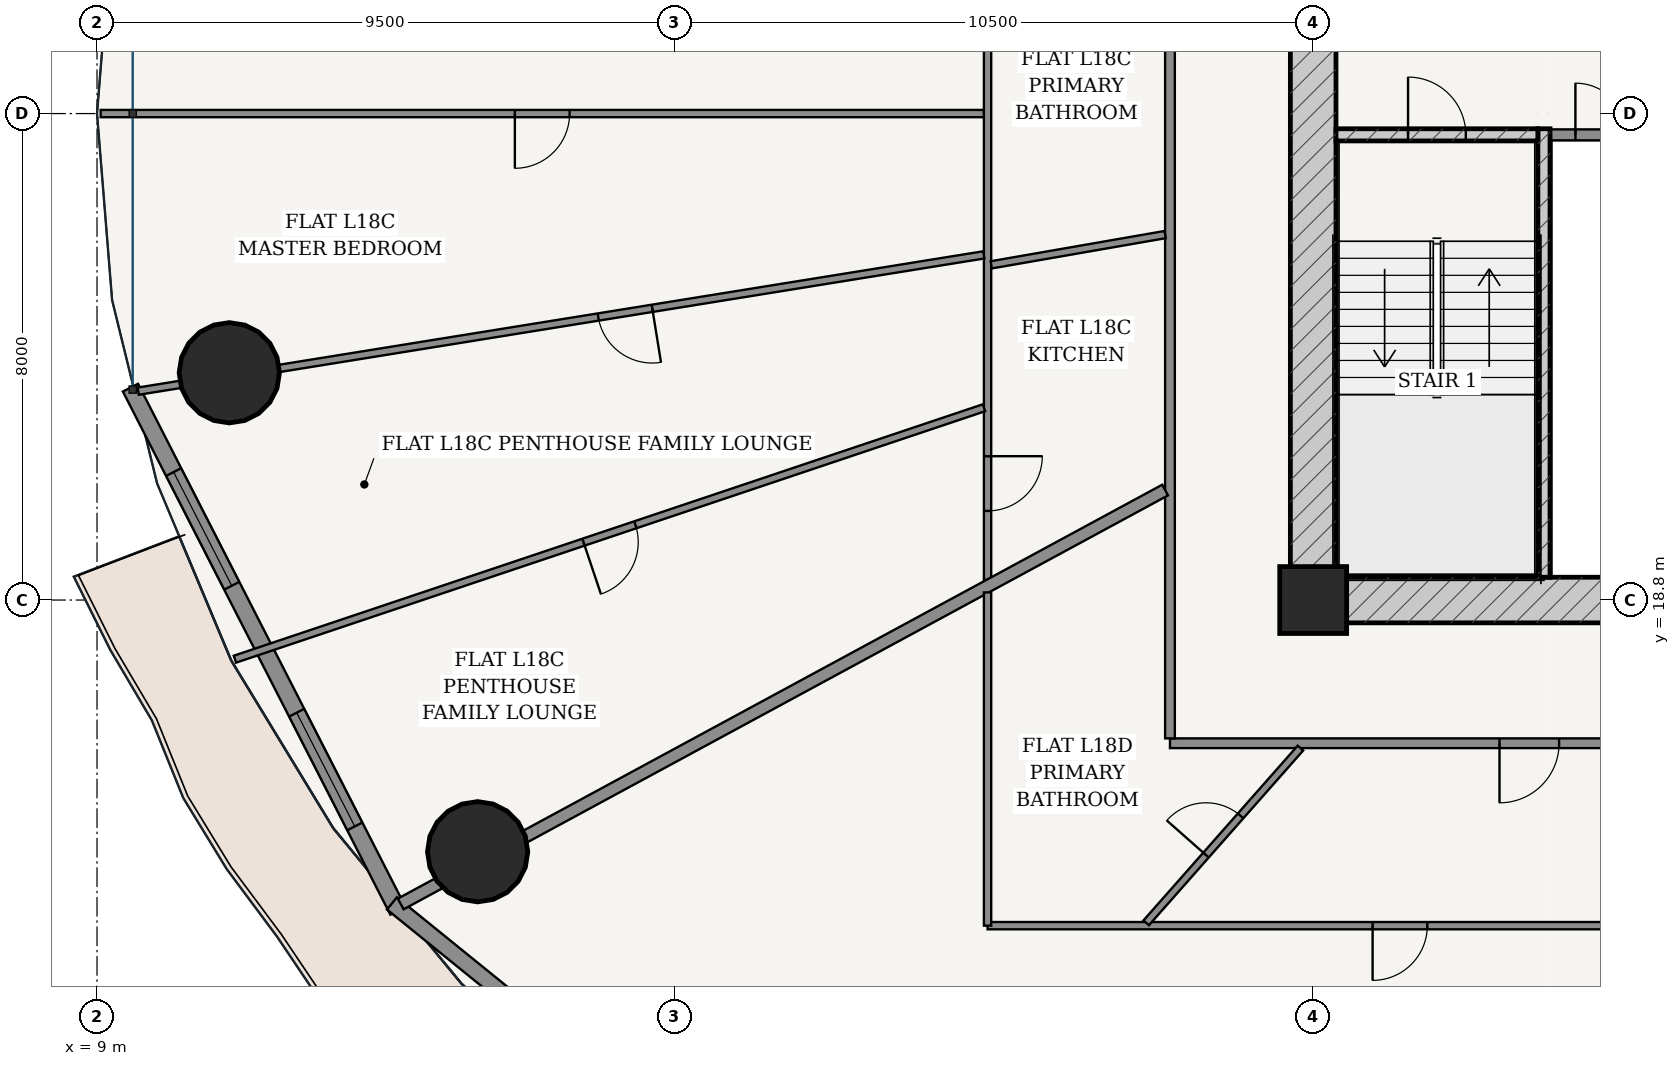
"""IFC4 building model, lengths in metres.
Left out: names, types, materials, properties, quantities, classifications, styles, units other than length and angle.
Written with IfcOpenShell. Run it as: python <this file> out.ifc"""

import sys

from ifc_helpers import new_model, si_unit, direction, frame, frame_2d, origin, origin_2d, place, context, subcontext, project, spatial, rectangle, hollow_circle, extrude, source, transform, mapped, element, fill, save


model = new_model("IFC4")
c1 = context("Model", 3, precision=1e-05, world=origin(), true_north=direction((-0.2419218956, 0.970295726276)))
c2 = subcontext(c1, "Body", "Model", "MODEL_VIEW")
j1 = project(units=[si_unit("LENGTHUNIT", "METRE"), si_unit("PLANEANGLEUNIT", "RADIAN")], contexts=[c1])
p1 = place(None, origin())
s1 = spatial("IfcSite", under=j1, at=p1, CompositionType="ELEMENT")
p2 = place(p1, origin())
s2 = spatial("IfcBuilding", under=s1, at=p2, CompositionType="ELEMENT")
p3 = place(p2, frame((0.0, 0.0, 70.8)))
s3 = spatial("IfcBuildingStorey", under=s2, at=p3, CompositionType="ELEMENT", Elevation=70.8)
p4 = place(p3, frame((29.0, 18.8, 0.0), z_axis=(0.0, 0.0, 1.0), x_axis=(1.0, 0.0, 0.0)))
e1 = element("IfcColumn", 1, at=p4, inside=s3, PredefinedType="COLUMN", context=c2, shape_type="SweptSolid", body=[
    extrude(rectangle(XDim=1.1, YDim=1.1, at=origin_2d()), origin(), (0.0, 0.0, 1.0), 3.6),
])
p5 = place(p3, frame((28.625, 18.8, 0.0), z_axis=(0.0, 0.0, 1.0), x_axis=(1.0, 0.0, 0.0)))
e2 = element("IfcWall", 2, at=p5, inside=s3, PredefinedType="SHEAR", context=c2, shape_type="SweptSolid", body=[
    extrude(rectangle(XDim=18.75, YDim=0.75, at=frame_2d((9.375, 0.0))), origin(), (0.0, 0.0, 1.0), 3.15),
])
p6 = place(p5, frame((6.927, 0.0, 0.0)))
e3 = element("IfcOpeningElement", 3, at=p6, cuts=e2, PredefinedType="OPENING", context=c2, shape_type="SweptSolid", body=[
    extrude(rectangle(XDim=0.85, YDim=2.1, at=frame_2d((0.425, 1.05))), frame((0.0, 0.385, 0.0), z_axis=(0.0, -1.0, 0.0), x_axis=(1.0, 0.0, 0.0)), (0.0, 0.0, 1.0), 0.77),
])
p7 = place(p5, frame((8.95, 0.0, 0.0)))
e4 = element("IfcOpeningElement", 4, at=p7, cuts=e2, PredefinedType="OPENING", context=c2, shape_type="SweptSolid", body=[
    extrude(rectangle(XDim=0.85, YDim=2.1, at=frame_2d((0.425, 1.05))), frame((0.0, 0.385, 0.0), z_axis=(0.0, -1.0, 0.0), x_axis=(1.0, 0.0, 0.0)), (0.0, 0.0, 1.0), 0.77),
])
p8 = place(p5, frame((10.972, 0.0, 0.0)))
e5 = element("IfcOpeningElement", 5, at=p8, cuts=e2, PredefinedType="OPENING", context=c2, shape_type="SweptSolid", body=[
    extrude(rectangle(XDim=0.85, YDim=2.1, at=frame_2d((0.425, 1.05))), frame((0.0, 0.385, 0.0), z_axis=(0.0, -1.0, 0.0), x_axis=(1.0, 0.0, 0.0)), (0.0, 0.0, 1.0), 0.77),
])
p9 = place(p3, frame((29.0, 19.175, 0.0), z_axis=(0.0, 0.0, 1.0), x_axis=(0.0, 1.0, 0.0)))
e6 = element("IfcWall", 6, at=p9, inside=s3, PredefinedType="SHEAR", context=c2, shape_type="SweptSolid", body=[
    extrude(rectangle(XDim=15.25, YDim=0.75, at=frame_2d((7.625, 0.0))), origin(), (0.0, 0.0, 1.0), 3.15),
])
p10 = place(p9, frame((9.875, 0.0, 0.0)))
e7 = element("IfcOpeningElement", 7, at=p10, cuts=e6, PredefinedType="OPENING", context=c2, shape_type="SweptSolid", body=[
    extrude(rectangle(XDim=1.5, YDim=2.2, at=frame_2d((0.75, 1.1))), frame((0.0, 0.385, 0.0), z_axis=(0.0, -1.0, 0.0), x_axis=(1.0, 0.0, 0.0)), (0.0, 0.0, 1.0), 0.77),
])
p11 = place(p3, frame((32.795, 19.175, 0.0), z_axis=(0.0, 0.0, 1.0), x_axis=(0.0, 1.0, 0.0)))
e8 = element("IfcWall", 8, at=p11, inside=s3, PredefinedType="SOLIDWALL", context=c2, shape_type="SweptSolid", body=[
    extrude(rectangle(XDim=7.375, YDim=0.2, at=frame_2d((3.688, 0.0))), origin(), (0.0, 0.0, 1.0), 3.15),
])
p12 = place(p3, frame((29.375, 26.45, 0.0), z_axis=(0.0, 0.0, 1.0), x_axis=(1.0, 0.0, 0.0)))
e9 = element("IfcWall", 9, at=p12, inside=s3, PredefinedType="SOLIDWALL", context=c2, shape_type="SweptSolid", body=[
    extrude(rectangle(XDim=3.32, YDim=0.2, at=frame_2d((1.66, 0.0))), origin(), (0.0, 0.0, 1.0), 3.15),
])
p13 = place(p12, frame((1.185, 0.0, 0.0)))
e10 = element("IfcOpeningElement", 10, at=p13, cuts=e9, PredefinedType="OPENING", context=c2, shape_type="SweptSolid", body=[
    extrude(rectangle(XDim=0.95, YDim=2.15, at=frame_2d((0.475, 1.075))), frame((0.0, 0.11, 0.0), z_axis=(0.0, -1.0, 0.0), x_axis=(1.0, 0.0, 0.0)), (0.0, 0.0, 1.0), 0.22),
])
for number, where, z_axis, x_axis in (
    (11, (11.176, 22.537, 0.0), (0.0, 0.0, 1.0), (1.0, 0.0, 0.0)),
    (12, (15.259, 14.661, 0.0), (0.0, 0.0, 1.0), (1.0, 0.0, 0.0)),
):
    element("IfcColumn", number, at=place(p3, frame(where, z_axis=z_axis, x_axis=x_axis)), inside=s3, PredefinedType="COLUMN", context=c2, shape_type="SweptSolid", body=[
        extrude(hollow_circle(Radius=0.825, WallThickness=0.05, at=origin_2d()), origin(), (0.0, 0.0, 1.0), 3.6),
    ])
p14 = place(p3, frame((9.55, 22.292, 0.0), z_axis=(0.0, 0.0, 1.0), x_axis=(0.455220575541, -0.890378698984, 0.0)))
e13 = element("IfcWall", 13, at=p14, inside=s3, PredefinedType="SOLIDWALL", context=c2, shape_type="SweptSolid", body=[
    extrude(rectangle(XDim=9.662, YDim=0.28, at=frame_2d((4.831, 0.0))), origin(), (0.0, 0.0, 1.0), 3.15),
])
p15 = place(p14, frame((1.559, 0.0, 0.85)))
e14 = element("IfcOpeningElement", 14, at=p15, cuts=e13, PredefinedType="OPENING", context=c2, shape_type="SweptSolid", body=[
    extrude(rectangle(XDim=2.1, YDim=1.95, at=frame_2d((1.05, 0.975))), frame((0.0, 0.15, 0.0), z_axis=(0.0, -1.0, 0.0), x_axis=(1.0, 0.0, 0.0)), (0.0, 0.0, 1.0), 0.3),
])
p16 = place(p14, frame((6.003, 0.0, 0.85)))
e15 = element("IfcOpeningElement", 15, at=p16, cuts=e13, PredefinedType="OPENING", context=c2, shape_type="SweptSolid", body=[
    extrude(rectangle(XDim=2.1, YDim=1.95, at=frame_2d((1.05, 0.975))), frame((0.0, 0.15, 0.0), z_axis=(0.0, -1.0, 0.0), x_axis=(1.0, 0.0, 0.0)), (0.0, 0.0, 1.0), 0.3),
])
p17 = place(p3, frame((13.85, 13.811, 0.0), z_axis=(0.0, 0.0, 1.0), x_axis=(0.777016782851, -0.629479879875, 0.0)))
e16 = element("IfcWall", 16, at=p17, inside=s3, PredefinedType="SOLIDWALL", context=c2, shape_type="SweptSolid", body=[
    extrude(rectangle(XDim=10.447, YDim=0.26, at=frame_2d((5.223, 0.0))), origin(), (0.0, 0.0, 1.0), 3.15),
])
p18 = place(p17, frame((4.548, 0.0, 0.0)))
e17 = element("IfcOpeningElement", 17, at=p18, cuts=e16, PredefinedType="OPENING", context=c2, shape_type="SweptSolid", body=[
    extrude(rectangle(XDim=1.35, YDim=2.2, at=frame_2d((0.675, 1.1))), frame((0.0, 0.14, 0.0), z_axis=(0.0, -1.0, 0.0), x_axis=(1.0, 0.0, 0.0)), (0.0, 0.0, 1.0), 0.28),
])
p19 = place(p3, frame((32.9, 26.45, 0.0), z_axis=(0.0, 0.0, 1.0), x_axis=(1.0, 0.0, 0.0)))
e18 = element("IfcWall", 18, at=p19, inside=s3, PredefinedType="PARTITIONING", context=c2, shape_type="SweptSolid", body=[
    extrude(rectangle(XDim=1.675, YDim=0.18, at=frame_2d((0.837, 0.0))), origin(), (0.0, 0.0, 1.0), 3.15),
])
p20 = place(p19, frame((0.413, 0.0, 0.0)))
e19 = element("IfcOpeningElement", 19, at=p20, cuts=e18, PredefinedType="OPENING", context=c2, shape_type="SweptSolid", body=[
    extrude(rectangle(XDim=0.85, YDim=2.1, at=frame_2d((0.425, 1.05))), frame((0.0, 0.1, 0.0), z_axis=(0.0, -1.0, 0.0), x_axis=(1.0, 0.0, 0.0)), (0.0, 0.0, 1.0), 0.2),
])
p21 = place(p3, frame((26.645, 16.445, 0.0), z_axis=(0.0, 0.0, 1.0), x_axis=(1.0, 0.0, 0.0)))
e20 = element("IfcWall", 20, at=p21, inside=s3, PredefinedType="PARTITIONING", context=c2, shape_type="SweptSolid", body=[
    extrude(rectangle(XDim=22.71, YDim=0.16, at=frame_2d((11.355, 0.0))), origin(), (0.0, 0.0, 1.0), 2.596),
])
p22 = place(p21, frame((5.419, 0.0, 0.0)))
e21 = element("IfcOpeningElement", 21, at=p22, cuts=e20, PredefinedType="OPENING", context=c2, shape_type="SweptSolid", body=[
    extrude(rectangle(XDim=0.98, YDim=2.2, at=frame_2d((0.49, 1.1))), frame((0.0, 0.09, 0.0), z_axis=(0.0, -1.0, 0.0), x_axis=(1.0, 0.0, 0.0)), (0.0, 0.0, 1.0), 0.18),
])
p23 = place(p3, frame((26.645, 16.525, 0.0), z_axis=(0.0, 0.0, 1.0), x_axis=(0.0, 1.0, 0.0)))
e22 = element("IfcWall", 22, at=p23, inside=s3, PredefinedType="PARTITIONING", context=c2, shape_type="SweptSolid", body=[
    extrude(rectangle(XDim=20.55, YDim=0.16, at=frame_2d((10.275, 0.0))), origin(), (0.0, 0.0, 1.0), 2.596),
])
p24 = place(p23, frame((16.199, 0.0, 0.0)))
e23 = element("IfcOpeningElement", 23, at=p24, cuts=e22, PredefinedType="OPENING", context=c2, shape_type="SweptSolid", body=[
    extrude(rectangle(XDim=0.98, YDim=2.2, at=frame_2d((0.49, 1.1))), frame((0.0, 0.09, 0.0), z_axis=(0.0, -1.0, 0.0), x_axis=(1.0, 0.0, 0.0)), (0.0, 0.0, 1.0), 0.18),
])
p25 = place(p3, frame((23.645, 19.129, 0.0), z_axis=(0.0, 0.0, 1.0), x_axis=(0.0, 1.0, 0.0)))
e24 = element("IfcWall", 24, at=p25, inside=s3, PredefinedType="PARTITIONING", context=c2, shape_type="SweptSolid", body=[
    extrude(rectangle(XDim=19.201, YDim=0.12, at=frame_2d((9.601, 0.0))), origin(), (0.0, 0.0, 1.0), 2.596),
])
p26 = place(p25, frame((15.038, 0.0, 0.0)))
e25 = element("IfcOpeningElement", 25, at=p26, cuts=e24, PredefinedType="OPENING", context=c2, shape_type="SweptSolid", body=[
    extrude(rectangle(XDim=0.9, YDim=2.15, at=frame_2d((0.45, 1.075))), frame((0.0, 0.07, 0.0), z_axis=(0.0, -1.0, 0.0), x_axis=(1.0, 0.0, 0.0)), (0.0, 0.0, 1.0), 0.14),
])
p27 = place(p25, frame((1.136, 0.0, 0.0)))
e26 = element("IfcOpeningElement", 26, at=p27, cuts=e24, PredefinedType="OPENING", context=c2, shape_type="SweptSolid", body=[
    extrude(rectangle(XDim=0.9, YDim=2.15, at=frame_2d((0.45, 1.075))), frame((0.0, 0.07, 0.0), z_axis=(0.0, -1.0, 0.0), x_axis=(1.0, 0.0, 0.0)), (0.0, 0.0, 1.0), 0.14),
])
p28 = place(p3, frame((23.583, 26.8, 0.0), z_axis=(0.0, 0.0, 1.0), x_axis=(-1.0, 0.0, 0.0)))
e27 = element("IfcWall", 27, at=p28, inside=s3, PredefinedType="PARTITIONING", context=c2, shape_type="SweptSolid", body=[
    extrude(rectangle(XDim=14.523, YDim=0.12, at=frame_2d((7.261, 0.0))), origin(), (0.0, 0.0, 1.0), 2.666),
])
p29 = place(p28, frame((6.812, 0.0, 0.0)))
e28 = element("IfcOpeningElement", 28, at=p29, cuts=e27, PredefinedType="OPENING", context=c2, shape_type="SweptSolid", body=[
    extrude(rectangle(XDim=0.9, YDim=2.15, at=frame_2d((0.45, 1.075))), frame((0.0, 0.07, 0.0), z_axis=(0.0, -1.0, 0.0), x_axis=(1.0, 0.0, 0.0)), (0.0, 0.0, 1.0), 0.14),
])
p30 = place(p3, frame((23.584, 24.476, 0.0), z_axis=(0.0, 0.0, 1.0), x_axis=(-0.987257727093, -0.159129445092, 0.0)))
e29 = element("IfcWall", 29, at=p30, inside=s3, PredefinedType="PARTITIONING", context=c2, shape_type="SweptSolid", body=[
    extrude(rectangle(XDim=14.086, YDim=0.12, at=frame_2d((7.043, 0.0))), origin(), (0.0, 0.0, 1.0), 2.5),
])
p31 = place(p30, frame((5.523, 0.0, 0.0)))
e30 = element("IfcOpeningElement", 30, at=p31, cuts=e29, PredefinedType="OPENING", context=c2, shape_type="SweptSolid", body=[
    extrude(rectangle(XDim=0.9, YDim=2.15, at=frame_2d((0.45, 1.075))), frame((0.0, 0.07, 0.0), z_axis=(0.0, -1.0, 0.0), x_axis=(1.0, 0.0, 0.0)), (0.0, 0.0, 1.0), 0.14),
])
p32 = place(p3, frame((23.586, 21.962, 0.0), z_axis=(0.0, 0.0, 1.0), x_axis=(-0.948021751459, -0.318205529118, 0.0)))
e31 = element("IfcWall", 31, at=p32, inside=s3, PredefinedType="PARTITIONING", context=c2, shape_type="SweptSolid", body=[
    extrude(rectangle(XDim=12.994, YDim=0.12, at=frame_2d((6.497, 0.0))), origin(), (0.0, 0.0, 1.0), 2.666),
])
p33 = place(p32, frame((6.047, 0.0, 0.0)))
e32 = element("IfcOpeningElement", 32, at=p33, cuts=e31, PredefinedType="OPENING", context=c2, shape_type="SweptSolid", body=[
    extrude(rectangle(XDim=0.9, YDim=2.15, at=frame_2d((0.45, 1.075))), frame((0.0, 0.07, 0.0), z_axis=(0.0, -1.0, 0.0), x_axis=(1.0, 0.0, 0.0)), (0.0, 0.0, 1.0), 0.14),
])
p34 = place(p3, frame((26.565, 24.81, 0.0), z_axis=(0.0, 0.0, 1.0), x_axis=(-0.985190752909, -0.171461891924, 0.0)))
e33 = element("IfcWall", 33, at=p34, inside=s3, PredefinedType="PARTITIONING", context=c2, shape_type="SweptSolid", body=[
    extrude(rectangle(XDim=2.902, YDim=0.12, at=frame_2d((1.451, 0.0))), origin(), (0.0, 0.0, 1.0), 2.596),
])
p35 = place(p3, frame((26.565, 20.608, 0.0), z_axis=(0.0, 0.0, 1.0), x_axis=(-0.879369737803, -0.476139542819, 0.0)))
e34 = element("IfcWall", 34, at=p35, inside=s3, PredefinedType="PARTITIONING", context=c2, shape_type="SweptSolid", body=[
    extrude(rectangle(XDim=14.295, YDim=0.2, at=frame_2d((7.147, 0.0))), origin(), (0.0, 0.0, 1.0), 2.5),
])
p36 = place(p3, frame((41.176, 13.445, 0.0), z_axis=(0.0, 0.0, 1.0), x_axis=(-1.0, 0.0, 0.0)))
e35 = element("IfcWall", 35, at=p36, inside=s3, PredefinedType="PARTITIONING", context=c2, shape_type="SweptSolid", body=[
    extrude(rectangle(XDim=17.531, YDim=0.12, at=frame_2d((8.766, 0.0))), origin(), (0.0, 0.0, 1.0), 2.596),
])
p37 = place(p36, frame((10.299, 0.0, 0.0)))
e36 = element("IfcOpeningElement", 36, at=p37, cuts=e35, PredefinedType="OPENING", context=c2, shape_type="SweptSolid", body=[
    extrude(rectangle(XDim=0.9, YDim=2.15, at=frame_2d((0.45, 1.075))), frame((0.0, 0.07, 0.0), z_axis=(0.0, -1.0, 0.0), x_axis=(1.0, 0.0, 0.0)), (0.0, 0.0, 1.0), 0.14),
])
p38 = place(p36, frame((1.258, 0.0, 0.0)))
e37 = element("IfcOpeningElement", 37, at=p38, cuts=e35, PredefinedType="OPENING", context=c2, shape_type="SweptSolid", body=[
    extrude(rectangle(XDim=0.9, YDim=2.15, at=frame_2d((0.45, 1.075))), frame((0.0, 0.07, 0.0), z_axis=(0.0, -1.0, 0.0), x_axis=(1.0, 0.0, 0.0)), (0.0, 0.0, 1.0), 0.14),
])
p39 = place(p3, frame((23.645, 13.445, 0.0), z_axis=(0.0, 0.0, 1.0), x_axis=(0.0, 1.0, 0.0)))
e38 = element("IfcWall", 38, at=p39, inside=s3, PredefinedType="PARTITIONING", context=c2, shape_type="SweptSolid", body=[
    extrude(rectangle(XDim=5.48, YDim=0.12, at=frame_2d((2.74, 0.0))), origin(), (0.0, 0.0, 1.0), 2.596),
])
p40 = place(p3, frame((34.707, 13.385, 0.0), z_axis=(0.0, 0.0, 1.0), x_axis=(-0.238386763388, -0.971170299711, 0.0)))
e39 = element("IfcWall", 39, at=p40, inside=s3, PredefinedType="PARTITIONING", context=c2, shape_type="SweptSolid", body=[
    extrude(rectangle(XDim=9.808, YDim=0.12, at=frame_2d((4.904, 0.0))), origin(), (0.0, 0.0, 1.0), 2.5),
])
p41 = place(p3, frame((28.79, 16.365, 0.0), z_axis=(0.0, 0.0, 1.0), x_axis=(-0.661718545222, -0.749752337048, 0.0)))
e40 = element("IfcWall", 40, at=p41, inside=s3, PredefinedType="PARTITIONING", context=c2, shape_type="SweptSolid", body=[
    extrude(rectangle(XDim=3.833, YDim=0.12, at=frame_2d((1.917, 0.0))), origin(), (0.0, 0.0, 1.0), 2.596),
])
p42 = place(p41, frame((1.486, 0.0, 0.0)))
e41 = element("IfcOpeningElement", 41, at=p42, cuts=e40, PredefinedType="OPENING", context=c2, shape_type="SweptSolid", body=[
    extrude(rectangle(XDim=0.86, YDim=2.15, at=frame_2d((0.43, 1.075))), frame((0.0, 0.07, 0.0), z_axis=(0.0, -1.0, 0.0), x_axis=(1.0, 0.0, 0.0)), (0.0, 0.0, 1.0), 0.14),
])
m1 = source(origin(), c2, "Body", "SweptSolid", [
    extrude(rectangle(XDim=2.1, YDim=1.95, at=frame_2d((1.05, 0.975))), frame((0.0, 0.03, 0.0), z_axis=(0.0, -1.0, 0.0), x_axis=(1.0, 0.0, 0.0)), (0.0, 0.0, 1.0), 0.06),
])
p43 = place(p15, origin())
e42 = element("IfcWindow", 42, at=p43, inside=s3, PartitioningType="SINGLE_PANEL", PredefinedType="WINDOW", context=c2, shape_type="MappedRepresentation", body=[
    mapped(m1, transform((0.0, 0.0, 0.0), scale=1.0)),
])
fill(e14, e42)
p44 = place(p16, origin())
e43 = element("IfcWindow", 43, at=p44, inside=s3, PartitioningType="SINGLE_PANEL", PredefinedType="WINDOW", context=c2, shape_type="MappedRepresentation", body=[
    mapped(m1, transform((0.0, 0.0, 0.0), scale=1.0)),
])
fill(e15, e43)
m2 = source(origin(), c2, "Body", "SweptSolid", [
    extrude(rectangle(XDim=0.95, YDim=2.15, at=frame_2d((0.475, 1.075))), frame((0.0, 0.025, 0.0), z_axis=(0.0, -1.0, 0.0), x_axis=(1.0, 0.0, 0.0)), (0.0, 0.0, 1.0), 0.05),
])
p45 = place(p13, origin())
e44 = element("IfcDoor", 44, at=p45, inside=s3, OperationType="SINGLE_SWING_LEFT", PredefinedType="DOOR", context=c2, shape_type="MappedRepresentation", body=[
    mapped(m2, transform((0.0, 0.0, 0.0), scale=1.0)),
])
fill(e10, e44)
m3 = source(origin(), c2, "Body", "SweptSolid", [
    extrude(rectangle(XDim=0.85, YDim=2.1, at=frame_2d((0.425, 1.05))), frame((0.0, 0.025, 0.0), z_axis=(0.0, -1.0, 0.0), x_axis=(1.0, 0.0, 0.0)), (0.0, 0.0, 1.0), 0.05),
])
p46 = place(p20, origin())
e45 = element("IfcDoor", 45, at=p46, inside=s3, OperationType="SINGLE_SWING_LEFT", PredefinedType="DOOR", context=c2, shape_type="MappedRepresentation", body=[
    mapped(m3, transform((0.0, 0.0, 0.0), scale=1.0)),
])
fill(e19, e45)
m4 = source(origin(), c2, "Body", "SweptSolid", [
    extrude(rectangle(XDim=0.9, YDim=2.15, at=frame_2d((0.45, 1.075))), frame((0.0, 0.025, 0.0), z_axis=(0.0, -1.0, 0.0), x_axis=(1.0, 0.0, 0.0)), (0.0, 0.0, 1.0), 0.05),
])
p47 = place(p29, origin())
e46 = element("IfcDoor", 46, at=p47, inside=s3, OperationType="SINGLE_SWING_RIGHT", PredefinedType="DOOR", context=c2, shape_type="MappedRepresentation", body=[
    mapped(m4, transform((0.0, 0.0, 0.0), scale=1.0)),
])
fill(e28, e46)
p48 = place(p31, origin())
e47 = element("IfcDoor", 47, at=p48, inside=s3, OperationType="SINGLE_SWING_LEFT", PredefinedType="DOOR", context=c2, shape_type="MappedRepresentation", body=[
    mapped(m4, transform((0.0, 0.0, 0.0), scale=1.0)),
])
fill(e30, e47)
p49 = place(p33, origin())
e48 = element("IfcDoor", 48, at=p49, inside=s3, OperationType="SINGLE_SWING_RIGHT", PredefinedType="DOOR", context=c2, shape_type="MappedRepresentation", body=[
    mapped(m4, transform((0.0, 0.0, 0.0), scale=1.0)),
])
fill(e32, e48)
p50 = place(p27, frame((0.9, 0.0, 0.0), z_axis=(0.0, 0.0, 1.0), x_axis=(-1.0, 0.0, 0.0)))
e49 = element("IfcDoor", 49, at=p50, inside=s3, OperationType="SINGLE_SWING_LEFT", PredefinedType="DOOR", context=c2, shape_type="MappedRepresentation", body=[
    mapped(m4, transform((0.0, 0.0, 0.0), scale=1.0)),
])
fill(e26, e49)
m5 = source(origin(), c2, "Body", "SweptSolid", [
    extrude(rectangle(XDim=0.98, YDim=2.2, at=frame_2d((0.49, 1.1))), frame((0.0, 0.025, 0.0), z_axis=(0.0, -1.0, 0.0), x_axis=(1.0, 0.0, 0.0)), (0.0, 0.0, 1.0), 0.05),
])
p51 = place(p22, frame((0.98, 0.0, 0.0), z_axis=(0.0, 0.0, 1.0), x_axis=(-1.0, 0.0, 0.0)))
e50 = element("IfcDoor", 50, at=p51, inside=s3, OperationType="SINGLE_SWING_RIGHT", PredefinedType="DOOR", context=c2, shape_type="MappedRepresentation", body=[
    mapped(m5, transform((0.0, 0.0, 0.0), scale=1.0)),
])
fill(e21, e50)
m6 = source(origin(), c2, "Body", "SweptSolid", [
    extrude(rectangle(XDim=0.86, YDim=2.15, at=frame_2d((0.43, 1.075))), frame((0.0, 0.025, 0.0), z_axis=(0.0, -1.0, 0.0), x_axis=(1.0, 0.0, 0.0)), (0.0, 0.0, 1.0), 0.05),
])
p52 = place(p42, frame((0.86, 0.0, 0.0), z_axis=(0.0, 0.0, 1.0), x_axis=(-1.0, 0.0, 0.0)))
e51 = element("IfcDoor", 51, at=p52, inside=s3, OperationType="SINGLE_SWING_LEFT", PredefinedType="DOOR", context=c2, shape_type="MappedRepresentation", body=[
    mapped(m6, transform((0.0, 0.0, 0.0), scale=1.0)),
])
fill(e41, e51)
p53 = place(p37, origin())
e52 = element("IfcDoor", 52, at=p53, inside=s3, OperationType="SINGLE_SWING_RIGHT", PredefinedType="DOOR", context=c2, shape_type="MappedRepresentation", body=[
    mapped(m4, transform((0.0, 0.0, 0.0), scale=1.0)),
])
fill(e36, e52)
save(model, sys.argv[1])
